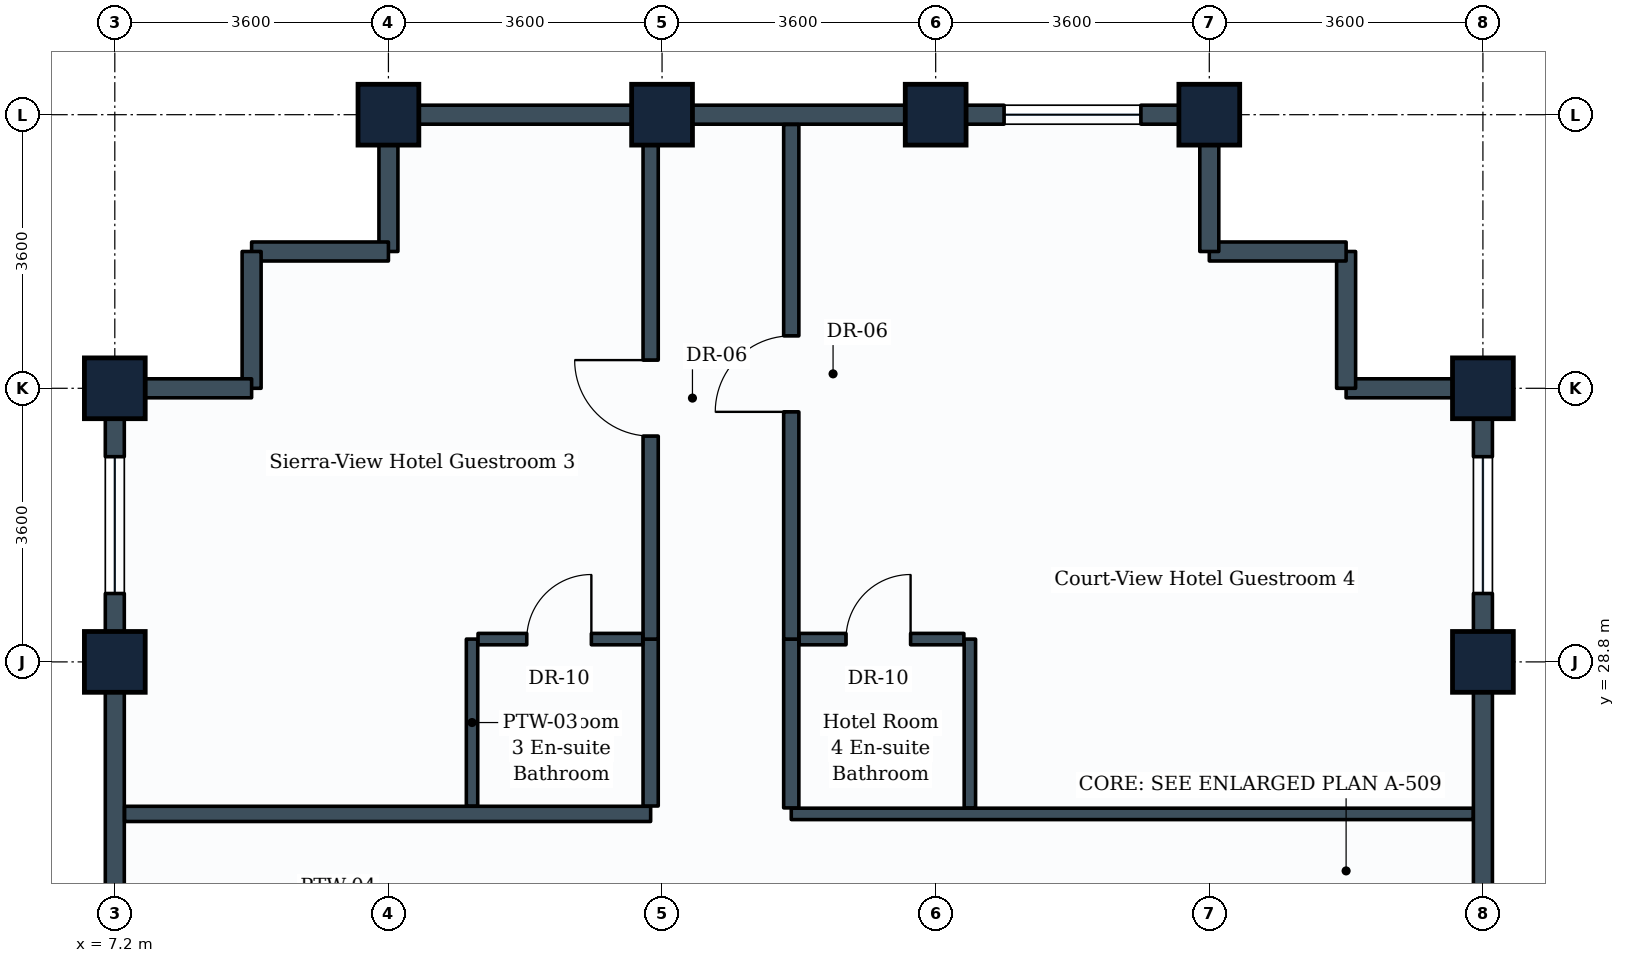
"""IFC4 building model, lengths in metres.
Left out: names, types, materials, properties, quantities, classifications, styles, units other than length and angle.
Written with IfcOpenShell. Run it as: python <this file> out.ifc"""

import sys

from ifc_helpers import new_model, si_unit, direction, frame, frame_2d, origin, origin_2d, place, context, subcontext, project, spatial, rectangle, extrude, element, fill, save


model = new_model("IFC4")
c1 = context("Model", 3, precision=1e-05, world=origin(), true_north=direction((0.0, 1.0)))
c2 = subcontext(c1, "Body", "Model", "MODEL_VIEW")
j1 = project(units=[si_unit("LENGTHUNIT", "METRE"), si_unit("PLANEANGLEUNIT", "RADIAN")], contexts=[c1])
p1 = place(None, origin())
s1 = spatial("IfcSite", under=j1, at=p1, CompositionType="ELEMENT")
p2 = place(p1, origin())
s2 = spatial("IfcBuilding", under=s1, at=p2, CompositionType="ELEMENT")
p3 = place(p2, frame((0.0, 0.0, 288.2)))
s3 = spatial("IfcBuildingStorey", under=s2, at=p3, CompositionType="ELEMENT", Elevation=288.2)
for number, where, z_axis, x_axis in (
    (1, (7.2, 28.8, 0.0), (0.0, 0.0, 1.0), (0.0, 1.0, 0.0)),
    (2, (7.2, 32.4, 0.0), (0.0, 0.0, 1.0), (0.0, 1.0, 0.0)),
    (3, (10.8, 36.0, 0.0), (0.0, 0.0, 1.0), (1.0, 0.0, 0.0)),
    (4, (14.4, 36.0, 0.0), (0.0, 0.0, 1.0), (1.0, 0.0, 0.0)),
    (5, (18.0, 36.0, 0.0), (0.0, 0.0, 1.0), (1.0, 0.0, 0.0)),
    (6, (21.6, 36.0, 0.0), (0.0, 0.0, 1.0), (1.0, 0.0, 0.0)),
    (7, (25.2, 28.8, 0.0), (0.0, 0.0, 1.0), (0.0, 1.0, 0.0)),
    (8, (25.2, 32.4, 0.0), (0.0, 0.0, 1.0), (0.0, 1.0, 0.0)),
):
    element("IfcColumn", number, at=place(p3, frame(where, z_axis=z_axis, x_axis=x_axis)), inside=s3, PredefinedType="COLUMN", context=c2, shape_type="SweptSolid", body=[
        extrude(rectangle(XDim=0.8, YDim=0.8, at=origin_2d()), origin(), (0.0, 0.0, 1.0), 3.6),
    ])
p4 = place(p3, frame((25.2, 28.8, 0.0), z_axis=(0.0, 0.0, 1.0), x_axis=(0.0, -1.0, 0.0)))
e9 = element("IfcWall", 9, at=p4, inside=s3, PredefinedType="STANDARD", context=c2, shape_type="SweptSolid", body=[
    extrude(rectangle(XDim=3.6, YDim=0.25, at=frame_2d((1.8, 0.0))), origin(), (0.0, 0.0, 1.0), 2.83),
])
p5 = place(p3, frame((25.2, 32.4, 0.0), z_axis=(0.0, 0.0, 1.0), x_axis=(0.0, -1.0, 0.0)))
e10 = element("IfcWall", 10, at=p5, inside=s3, PredefinedType="STANDARD", context=c2, shape_type="SweptSolid", body=[
    extrude(rectangle(XDim=3.6, YDim=0.25, at=frame_2d((1.8, 0.0))), origin(), (0.0, 0.0, 1.0), 2.83),
])
p6 = place(p5, frame((0.9, 0.0, 0.85)))
e11 = element("IfcOpeningElement", 11, at=p6, cuts=e10, PredefinedType="OPENING", context=c2, shape_type="SweptSolid", body=[
    extrude(rectangle(XDim=1.8, YDim=1.35, at=frame_2d((0.9, 0.675))), frame((0.0, 0.135, 0.0), z_axis=(0.0, -1.0, 0.0), x_axis=(1.0, 0.0, 0.0)), (0.0, 0.0, 1.0), 0.27),
])
p7 = place(p3, frame((23.4, 32.4, 0.0), z_axis=(0.0, 0.0, 1.0), x_axis=(1.0, 0.0, 0.0)))
e12 = element("IfcWall", 12, at=p7, inside=s3, PredefinedType="STANDARD", context=c2, shape_type="SweptSolid", body=[
    extrude(rectangle(XDim=1.8, YDim=0.25, at=frame_2d((0.9, 0.0))), origin(), (0.0, 0.0, 1.0), 2.83),
])
p8 = place(p3, frame((23.4, 32.4, 0.0), z_axis=(0.0, 0.0, 1.0), x_axis=(0.0, 1.0, 0.0)))
e13 = element("IfcWall", 13, at=p8, inside=s3, PredefinedType="STANDARD", context=c2, shape_type="SweptSolid", body=[
    extrude(rectangle(XDim=1.8, YDim=0.25, at=frame_2d((0.9, 0.0))), origin(), (0.0, 0.0, 1.0), 3.335),
])
p9 = place(p3, frame((21.6, 34.2, 0.0), z_axis=(0.0, 0.0, 1.0), x_axis=(1.0, 0.0, 0.0)))
e14 = element("IfcWall", 14, at=p9, inside=s3, PredefinedType="STANDARD", context=c2, shape_type="SweptSolid", body=[
    extrude(rectangle(XDim=1.8, YDim=0.25, at=frame_2d((0.9, 0.0))), origin(), (0.0, 0.0, 1.0), 3.335),
])
p10 = place(p3, frame((21.6, 34.2, 0.0), z_axis=(0.0, 0.0, 1.0), x_axis=(0.0, 1.0, 0.0)))
e15 = element("IfcWall", 15, at=p10, inside=s3, PredefinedType="STANDARD", context=c2, shape_type="SweptSolid", body=[
    extrude(rectangle(XDim=1.8, YDim=0.25, at=frame_2d((0.9, 0.0))), origin(), (0.0, 0.0, 1.0), 2.83),
])
p11 = place(p3, frame((18.0, 36.0, 0.0), z_axis=(0.0, 0.0, 1.0), x_axis=(1.0, 0.0, 0.0)))
e16 = element("IfcWall", 16, at=p11, inside=s3, PredefinedType="STANDARD", context=c2, shape_type="SweptSolid", body=[
    extrude(rectangle(XDim=3.6, YDim=0.25, at=frame_2d((1.8, 0.0))), origin(), (0.0, 0.0, 1.0), 2.83),
])
p12 = place(p11, frame((0.9, 0.0, 0.85)))
e17 = element("IfcOpeningElement", 17, at=p12, cuts=e16, PredefinedType="OPENING", context=c2, shape_type="SweptSolid", body=[
    extrude(rectangle(XDim=1.8, YDim=1.35, at=frame_2d((0.9, 0.675))), frame((0.0, 0.135, 0.0), z_axis=(0.0, -1.0, 0.0), x_axis=(1.0, 0.0, 0.0)), (0.0, 0.0, 1.0), 0.27),
])
p13 = place(p3, frame((14.4, 36.0, 0.0), z_axis=(0.0, 0.0, 1.0), x_axis=(1.0, 0.0, 0.0)))
e18 = element("IfcWall", 18, at=p13, inside=s3, PredefinedType="STANDARD", context=c2, shape_type="SweptSolid", body=[
    extrude(rectangle(XDim=3.6, YDim=0.25, at=frame_2d((1.8, 0.0))), origin(), (0.0, 0.0, 1.0), 2.83),
])
p14 = place(p3, frame((10.8, 36.0, 0.0), z_axis=(0.0, 0.0, 1.0), x_axis=(1.0, 0.0, 0.0)))
e19 = element("IfcWall", 19, at=p14, inside=s3, PredefinedType="STANDARD", context=c2, shape_type="SweptSolid", body=[
    extrude(rectangle(XDim=3.6, YDim=0.25, at=frame_2d((1.8, 0.0))), origin(), (0.0, 0.0, 1.0), 2.83),
])
p15 = place(p3, frame((10.8, 34.2, 0.0), z_axis=(0.0, 0.0, 1.0), x_axis=(0.0, 1.0, 0.0)))
e20 = element("IfcWall", 20, at=p15, inside=s3, PredefinedType="STANDARD", context=c2, shape_type="SweptSolid", body=[
    extrude(rectangle(XDim=1.8, YDim=0.25, at=frame_2d((0.9, 0.0))), origin(), (0.0, 0.0, 1.0), 2.83),
])
for number, where, z_axis, x_axis in (
    (21, (9.0, 34.2, 0.0), (0.0, 0.0, 1.0), (1.0, 0.0, 0.0)),
    (22, (9.0, 32.4, 0.0), (0.0, 0.0, 1.0), (0.0, 1.0, 0.0)),
):
    element("IfcWall", number, at=place(p3, frame(where, z_axis=z_axis, x_axis=x_axis)), inside=s3, PredefinedType="STANDARD", context=c2, shape_type="SweptSolid", body=[
        extrude(rectangle(XDim=1.8, YDim=0.25, at=frame_2d((0.9, 0.0))), origin(), (0.0, 0.0, 1.0), 3.335),
    ])
p16 = place(p3, frame((7.2, 32.4, 0.0), z_axis=(0.0, 0.0, 1.0), x_axis=(1.0, 0.0, 0.0)))
e23 = element("IfcWall", 23, at=p16, inside=s3, PredefinedType="STANDARD", context=c2, shape_type="SweptSolid", body=[
    extrude(rectangle(XDim=1.8, YDim=0.25, at=frame_2d((0.9, 0.0))), origin(), (0.0, 0.0, 1.0), 2.83),
])
p17 = place(p3, frame((7.2, 28.8, 0.0), z_axis=(0.0, 0.0, 1.0), x_axis=(0.0, 1.0, 0.0)))
e24 = element("IfcWall", 24, at=p17, inside=s3, PredefinedType="STANDARD", context=c2, shape_type="SweptSolid", body=[
    extrude(rectangle(XDim=3.6, YDim=0.25, at=frame_2d((1.8, 0.0))), origin(), (0.0, 0.0, 1.0), 2.83),
])
p18 = place(p17, frame((0.9, 0.0, 0.85)))
e25 = element("IfcOpeningElement", 25, at=p18, cuts=e24, PredefinedType="OPENING", context=c2, shape_type="SweptSolid", body=[
    extrude(rectangle(XDim=1.8, YDim=1.35, at=frame_2d((0.9, 0.675))), frame((0.0, 0.135, 0.0), z_axis=(0.0, -1.0, 0.0), x_axis=(1.0, 0.0, 0.0)), (0.0, 0.0, 1.0), 0.27),
])
p19 = place(p3, frame((7.2, 25.2, 0.0), z_axis=(0.0, 0.0, 1.0), x_axis=(0.0, 1.0, 0.0)))
e26 = element("IfcWall", 26, at=p19, inside=s3, PredefinedType="STANDARD", context=c2, shape_type="SweptSolid", body=[
    extrude(rectangle(XDim=3.6, YDim=0.25, at=frame_2d((1.8, 0.0))), origin(), (0.0, 0.0, 1.0), 2.83),
])
p20 = place(p3, frame((7.329, 26.8, 0.0), z_axis=(0.0, 0.0, 1.0), x_axis=(1.0, 0.0, 0.0)))
e27 = element("IfcWall", 27, at=p20, inside=s3, PredefinedType="PARTITIONING", context=c2, shape_type="SweptSolid", body=[
    extrude(rectangle(XDim=6.921, YDim=0.2, at=frame_2d((3.46, 0.0))), origin(), (0.0, 0.0, 1.0), 2.83),
])
p21 = place(p3, frame((14.25, 26.904, 0.0), z_axis=(0.0, 0.0, 1.0), x_axis=(0.0, 1.0, 0.0)))
e28 = element("IfcWall", 28, at=p21, inside=s3, PredefinedType="PARTITIONING", context=c2, shape_type="SweptSolid", body=[
    extrude(rectangle(XDim=2.196, YDim=0.2, at=frame_2d((1.098, 0.0))), origin(), (0.0, 0.0, 1.0), 3.03),
])
p22 = place(p3, frame((14.25, 29.1, 0.0), z_axis=(0.0, 0.0, 1.0), x_axis=(0.0, 1.0, 0.0)))
e29 = element("IfcWall", 29, at=p22, inside=s3, PredefinedType="PARTITIONING", context=c2, shape_type="SweptSolid", body=[
    extrude(rectangle(XDim=6.771, YDim=0.2, at=frame_2d((3.385, 0.0))), origin(), (0.0, 0.0, 1.0), 2.83),
])
p23 = place(p22, frame((2.671, 0.0, 0.0)))
e30 = element("IfcOpeningElement", 30, at=p23, cuts=e29, PredefinedType="OPENING", context=c2, shape_type="SweptSolid", body=[
    extrude(rectangle(XDim=1.0, YDim=2.1, at=frame_2d((0.5, 1.05))), frame((0.0, 0.11, 0.0), z_axis=(0.0, -1.0, 0.0), x_axis=(1.0, 0.0, 0.0)), (0.0, 0.0, 1.0), 0.22),
])
p24 = place(p3, frame((11.9, 26.904, 0.0), z_axis=(0.0, 0.0, 1.0), x_axis=(0.0, 1.0, 0.0)))
e31 = element("IfcWall", 31, at=p24, inside=s3, PredefinedType="PARTITIONING", context=c2, shape_type="SweptSolid", body=[
    extrude(rectangle(XDim=2.196, YDim=0.15, at=frame_2d((1.098, 0.0))), origin(), (0.0, 0.0, 1.0), 3.03),
])
p25 = place(p3, frame((11.979, 29.1, 0.0), z_axis=(0.0, 0.0, 1.0), x_axis=(1.0, 0.0, 0.0)))
e32 = element("IfcWall", 32, at=p25, inside=s3, PredefinedType="PARTITIONING", context=c2, shape_type="SweptSolid", body=[
    extrude(rectangle(XDim=2.167, YDim=0.15, at=frame_2d((1.083, 0.0))), origin(), (0.0, 0.0, 1.0), 3.335),
])
p26 = place(p25, frame((0.641, 0.0, 0.0)))
e33 = element("IfcOpeningElement", 33, at=p26, cuts=e32, PredefinedType="OPENING", context=c2, shape_type="SweptSolid", body=[
    extrude(rectangle(XDim=0.85, YDim=2.1, at=frame_2d((0.425, 1.05))), frame((0.0, 0.085, 0.0), z_axis=(0.0, -1.0, 0.0), x_axis=(1.0, 0.0, 0.0)), (0.0, 0.0, 1.0), 0.17),
])
p27 = place(p3, frame((16.1, 26.8, 0.0), z_axis=(0.0, 0.0, 1.0), x_axis=(1.0, 0.0, 0.0)))
e34 = element("IfcWall", 34, at=p27, inside=s3, PredefinedType="PARTITIONING", context=c2, shape_type="SweptSolid", body=[
    extrude(rectangle(XDim=8.971, YDim=0.15, at=frame_2d((4.485, 0.0))), origin(), (0.0, 0.0, 1.0), 2.83),
])
p28 = place(p3, frame((16.1, 26.879, 0.0), z_axis=(0.0, 0.0, 1.0), x_axis=(0.0, 1.0, 0.0)))
e35 = element("IfcWall", 35, at=p28, inside=s3, PredefinedType="PARTITIONING", context=c2, shape_type="SweptSolid", body=[
    extrude(rectangle(XDim=2.221, YDim=0.2, at=frame_2d((1.111, 0.0))), origin(), (0.0, 0.0, 1.0), 3.03),
])
p29 = place(p3, frame((16.1, 29.1, 0.0), z_axis=(0.0, 0.0, 1.0), x_axis=(0.0, 1.0, 0.0)))
e36 = element("IfcWall", 36, at=p29, inside=s3, PredefinedType="PARTITIONING", context=c2, shape_type="SweptSolid", body=[
    extrude(rectangle(XDim=6.771, YDim=0.2, at=frame_2d((3.385, 0.0))), origin(), (0.0, 0.0, 1.0), 2.83),
])
p30 = place(p29, frame((2.99, 0.0, 0.0)))
e37 = element("IfcOpeningElement", 37, at=p30, cuts=e36, PredefinedType="OPENING", context=c2, shape_type="SweptSolid", body=[
    extrude(rectangle(XDim=1.0, YDim=2.1, at=frame_2d((0.5, 1.05))), frame((0.0, 0.11, 0.0), z_axis=(0.0, -1.0, 0.0), x_axis=(1.0, 0.0, 0.0)), (0.0, 0.0, 1.0), 0.22),
])
p31 = place(p3, frame((18.45, 26.879, 0.0), z_axis=(0.0, 0.0, 1.0), x_axis=(0.0, 1.0, 0.0)))
e38 = element("IfcWall", 38, at=p31, inside=s3, PredefinedType="PARTITIONING", context=c2, shape_type="SweptSolid", body=[
    extrude(rectangle(XDim=2.221, YDim=0.15, at=frame_2d((1.111, 0.0))), origin(), (0.0, 0.0, 1.0), 3.03),
])
p32 = place(p3, frame((16.204, 29.1, 0.0), z_axis=(0.0, 0.0, 1.0), x_axis=(1.0, 0.0, 0.0)))
e39 = element("IfcWall", 39, at=p32, inside=s3, PredefinedType="PARTITIONING", context=c2, shape_type="SweptSolid", body=[
    extrude(rectangle(XDim=2.167, YDim=0.15, at=frame_2d((1.083, 0.0))), origin(), (0.0, 0.0, 1.0), 3.03),
])
p33 = place(p32, frame((0.616, 0.0, 0.0)))
e40 = element("IfcOpeningElement", 40, at=p33, cuts=e39, PredefinedType="OPENING", context=c2, shape_type="SweptSolid", body=[
    extrude(rectangle(XDim=0.85, YDim=2.1, at=frame_2d((0.425, 1.05))), frame((0.0, 0.085, 0.0), z_axis=(0.0, -1.0, 0.0), x_axis=(1.0, 0.0, 0.0)), (0.0, 0.0, 1.0), 0.17),
])
p34 = place(p6, origin())
e41 = element("IfcWindow", 41, at=p34, inside=s3, PartitioningType="SINGLE_PANEL", PredefinedType="WINDOW", context=c2, shape_type="SweptSolid", body=[
    extrude(rectangle(XDim=1.8, YDim=1.35, at=frame_2d((0.9, 0.675))), frame((0.0, 0.03, 0.0), z_axis=(0.0, -1.0, 0.0), x_axis=(1.0, 0.0, 0.0)), (0.0, 0.0, 1.0), 0.06),
])
fill(e11, e41)
p35 = place(p12, origin())
e42 = element("IfcWindow", 42, at=p35, inside=s3, PartitioningType="SINGLE_PANEL", PredefinedType="WINDOW", context=c2, shape_type="SweptSolid", body=[
    extrude(rectangle(XDim=1.8, YDim=1.35, at=frame_2d((0.9, 0.675))), frame((0.0, 0.03, 0.0), z_axis=(0.0, -1.0, 0.0), x_axis=(1.0, 0.0, 0.0)), (0.0, 0.0, 1.0), 0.06),
])
fill(e17, e42)
p36 = place(p18, origin())
e43 = element("IfcWindow", 43, at=p36, inside=s3, PartitioningType="SINGLE_PANEL", PredefinedType="WINDOW", context=c2, shape_type="SweptSolid", body=[
    extrude(rectangle(XDim=1.8, YDim=1.35, at=frame_2d((0.9, 0.675))), frame((0.0, 0.03, 0.0), z_axis=(0.0, -1.0, 0.0), x_axis=(1.0, 0.0, 0.0)), (0.0, 0.0, 1.0), 0.06),
])
fill(e25, e43)
p37 = place(p23, origin())
e44 = element("IfcDoor", 44, at=p37, inside=s3, OperationType="SINGLE_SWING_RIGHT", PredefinedType="DOOR", context=c2, shape_type="SweptSolid", body=[
    extrude(rectangle(XDim=1.0, YDim=2.1, at=frame_2d((0.5, 1.05))), frame((0.0, 0.025, 0.0), z_axis=(0.0, -1.0, 0.0), x_axis=(1.0, 0.0, 0.0)), (0.0, 0.0, 1.0), 0.05),
])
fill(e30, e44)
p38 = place(p26, origin())
e45 = element("IfcDoor", 45, at=p38, inside=s3, OperationType="SINGLE_SWING_RIGHT", PredefinedType="DOOR", context=c2, shape_type="SweptSolid", body=[
    extrude(rectangle(XDim=0.85, YDim=2.1, at=frame_2d((0.425, 1.05))), frame((0.0, 0.025, 0.0), z_axis=(0.0, -1.0, 0.0), x_axis=(1.0, 0.0, 0.0)), (0.0, 0.0, 1.0), 0.05),
])
fill(e33, e45)
p39 = place(p30, origin())
e46 = element("IfcDoor", 46, at=p39, inside=s3, OperationType="SINGLE_SWING_LEFT", PredefinedType="DOOR", context=c2, shape_type="SweptSolid", body=[
    extrude(rectangle(XDim=1.0, YDim=2.1, at=frame_2d((0.5, 1.05))), frame((0.0, 0.025, 0.0), z_axis=(0.0, -1.0, 0.0), x_axis=(1.0, 0.0, 0.0)), (0.0, 0.0, 1.0), 0.05),
])
fill(e37, e46)
p40 = place(p33, origin())
e47 = element("IfcDoor", 47, at=p40, inside=s3, OperationType="SINGLE_SWING_RIGHT", PredefinedType="DOOR", context=c2, shape_type="SweptSolid", body=[
    extrude(rectangle(XDim=0.85, YDim=2.1, at=frame_2d((0.425, 1.05))), frame((0.0, 0.025, 0.0), z_axis=(0.0, -1.0, 0.0), x_axis=(1.0, 0.0, 0.0)), (0.0, 0.0, 1.0), 0.05),
])
fill(e40, e47)
save(model, sys.argv[1])
